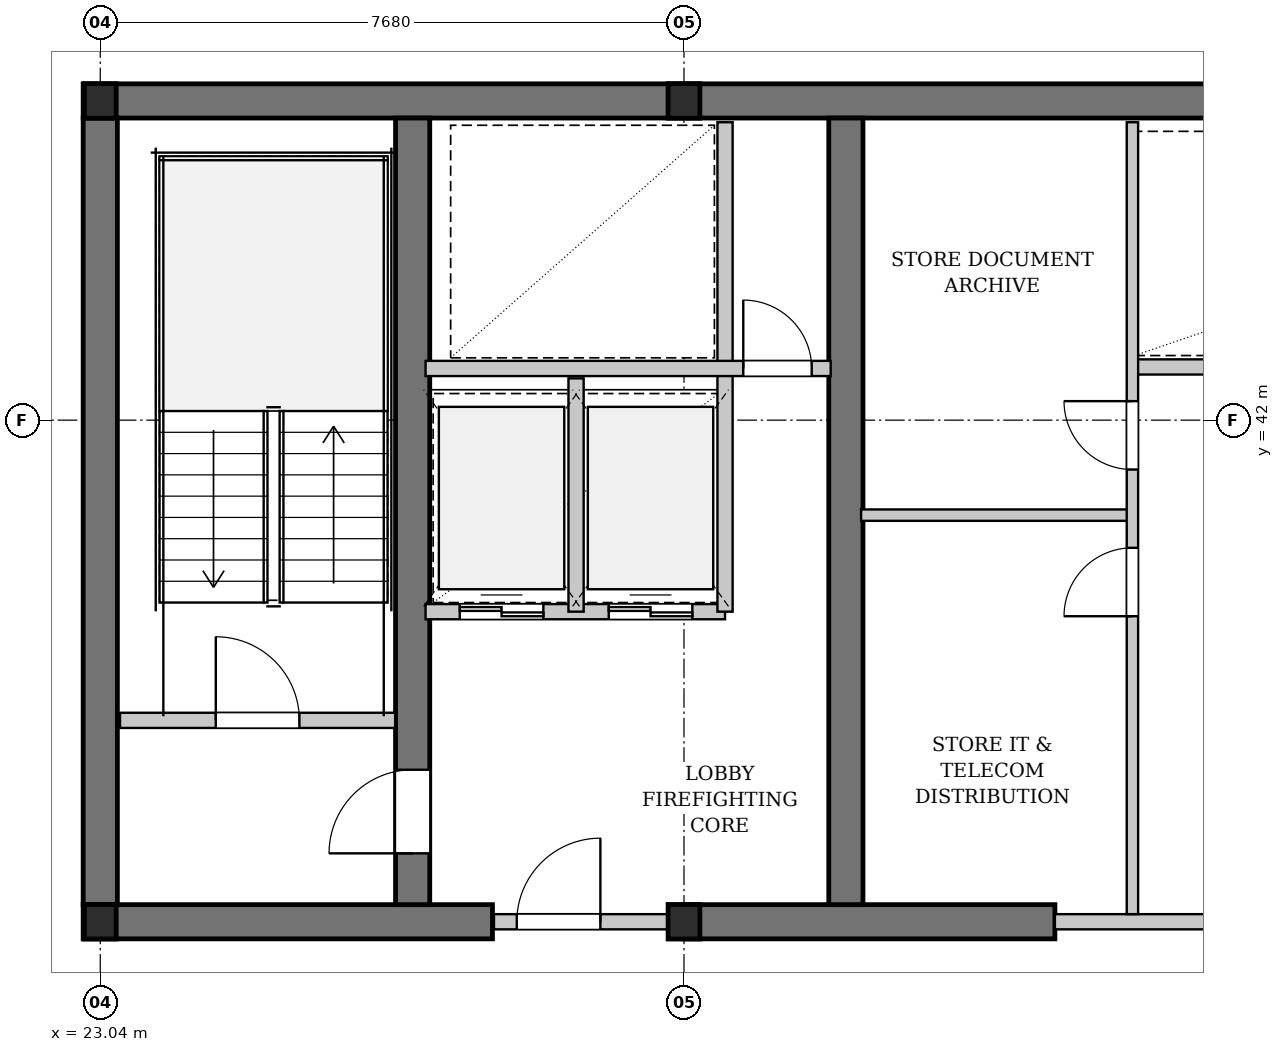
"""IFC4 building model, lengths in metres.
Left out: names, types, materials, properties, quantities, classifications, styles, units other than length and angle.
Written with IfcOpenShell. Run it as: python <this file> out.ifc"""

import sys

from ifc_helpers import new_model, si_unit, direction, frame, frame_2d, origin, origin_2d, place, context, subcontext, project, spatial, rectangle, i_section, extrude, element, fill, save


model = new_model("IFC4")
c1 = context("Model", 3, precision=1e-05, world=origin(), true_north=direction((0.0, 1.0)))
c2 = subcontext(c1, "Body", "Model", "MODEL_VIEW")
j1 = project(units=[si_unit("LENGTHUNIT", "METRE"), si_unit("PLANEANGLEUNIT", "RADIAN")], contexts=[c1])
p1 = place(None, origin())
s1 = spatial("IfcSite", under=j1, at=p1, CompositionType="ELEMENT")
p2 = place(p1, origin())
s2 = spatial("IfcBuilding", under=s1, at=p2, CompositionType="ELEMENT")
p3 = place(p2, frame((0.0, 0.0, 155.6)))
s3 = spatial("IfcBuildingStorey", under=s2, at=p3, CompositionType="ELEMENT", Elevation=155.6)
p4 = place(p3, frame((22.815, 46.2, 0.0), z_axis=(0.0, 0.0, 1.0), x_axis=(1.0, 0.0, 0.0)))
e1 = element("IfcWall", 1, at=p4, inside=s3, PredefinedType="SHEAR", context=c2, shape_type="SweptSolid", body=[
    extrude(rectangle(XDim=31.17, YDim=0.45, at=frame_2d((15.585, 0.0))), origin(), (0.0, 0.0, 1.0), 3.08),
])
p5 = place(p3, frame((22.815, 35.4, 0.0), z_axis=(0.0, 0.0, 1.0), x_axis=(1.0, 0.0, 0.0)))
e2 = element("IfcWall", 2, at=p5, inside=s3, PredefinedType="SHEAR", context=c2, shape_type="SweptSolid", body=[
    extrude(rectangle(XDim=5.385, YDim=0.45, at=frame_2d((2.692, 0.0))), origin(), (0.0, 0.0, 1.0), 3.08),
])
p6 = place(p3, frame((30.72, 35.4, 0.0), z_axis=(0.0, 0.0, 1.0), x_axis=(1.0, 0.0, 0.0)))
e3 = element("IfcWall", 3, at=p6, inside=s3, PredefinedType="SHEAR", context=c2, shape_type="SweptSolid", body=[
    extrude(rectangle(XDim=4.88, YDim=0.45, at=frame_2d((2.44, 0.0))), origin(), (0.0, 0.0, 1.0), 3.08),
])
p7 = place(p3, frame((23.04, 35.625, 0.0), z_axis=(0.0, 0.0, 1.0), x_axis=(0.0, 1.0, 0.0)))
e4 = element("IfcWall", 4, at=p7, inside=s3, PredefinedType="SHEAR", context=c2, shape_type="SweptSolid", body=[
    extrude(rectangle(XDim=10.35, YDim=0.45, at=frame_2d((5.175, 0.0))), origin(), (0.0, 0.0, 1.0), 3.08),
])
p8 = place(p3, frame((27.15, 35.625, 0.0), z_axis=(0.0, 0.0, 1.0), x_axis=(0.0, 1.0, 0.0)))
e5 = element("IfcWall", 5, at=p8, inside=s3, PredefinedType="SHEAR", context=c2, shape_type="SweptSolid", body=[
    extrude(rectangle(XDim=10.35, YDim=0.45, at=frame_2d((5.175, 0.0))), origin(), (0.0, 0.0, 1.0), 3.08),
])
p9 = place(p8, frame((0.675, 0.0, 0.0)))
e6 = element("IfcOpeningElement", 6, at=p9, cuts=e5, PredefinedType="OPENING", context=c2, shape_type="SweptSolid", body=[
    extrude(rectangle(XDim=1.1, YDim=2.15, at=frame_2d((0.55, 1.075))), frame((0.0, 0.235, 0.0), z_axis=(0.0, -1.0, 0.0), x_axis=(1.0, 0.0, 0.0)), (0.0, 0.0, 1.0), 0.47),
])
p10 = place(p3, frame((32.85, 35.625, 0.0), z_axis=(0.0, 0.0, 1.0), x_axis=(0.0, 1.0, 0.0)))
e7 = element("IfcWall", 7, at=p10, inside=s3, PredefinedType="SHEAR", context=c2, shape_type="SweptSolid", body=[
    extrude(rectangle(XDim=10.35, YDim=0.45, at=frame_2d((5.175, 0.0))), origin(), (0.0, 0.0, 1.0), 3.08),
])
for number, where, z_axis, x_axis in (
    (8, (23.04, 35.4, 0.0), (0.0, 0.0, 1.0), (1.0, 0.0, 0.0)),
    (9, (23.04, 46.2, 0.0), (0.0, 0.0, 1.0), (1.0, 0.0, 0.0)),
    (10, (30.72, 35.4, 0.0), (0.0, 0.0, 1.0), (1.0, 0.0, 0.0)),
    (11, (30.72, 46.2, 0.0), (0.0, 0.0, 1.0), (1.0, 0.0, 0.0)),
):
    element("IfcColumn", number, at=place(p3, frame(where, z_axis=z_axis, x_axis=x_axis)), inside=s3, PredefinedType="COLUMN", context=c2, shape_type="SweptSolid", body=[
        extrude(i_section(OverallWidth=0.418, OverallDepth=0.455, WebThickness=0.042, FlangeThickness=0.068, FilletRadius=0.015, at=origin_2d()), origin(), (0.0, 0.0, 1.0), 3.3),
    ])
p11 = place(p3, frame((23.3, 38.05, 0.0), z_axis=(0.0, 0.0, 1.0), x_axis=(1.0, 0.0, 0.0)))
e12 = element("IfcWall", 12, at=p11, inside=s3, PredefinedType="PARTITIONING", context=c2, shape_type="SweptSolid", body=[
    extrude(rectangle(XDim=3.62, YDim=0.2, at=frame_2d((1.81, 0.0))), origin(), (0.0, 0.0, 1.0), 3.08),
])
p12 = place(p11, frame((1.26, 0.0, 0.0)))
e13 = element("IfcOpeningElement", 13, at=p12, cuts=e12, PredefinedType="OPENING", context=c2, shape_type="SweptSolid", body=[
    extrude(rectangle(XDim=1.1, YDim=2.15, at=frame_2d((0.55, 1.075))), frame((0.0, 0.11, 0.0), z_axis=(0.0, -1.0, 0.0), x_axis=(1.0, 0.0, 0.0)), (0.0, 0.0, 1.0), 0.22),
])
p13 = place(p3, frame((28.22, 35.4, 0.0), z_axis=(0.0, 0.0, 1.0), x_axis=(1.0, 0.0, 0.0)))
e14 = element("IfcWall", 14, at=p13, inside=s3, PredefinedType="PARTITIONING", context=c2, shape_type="SweptSolid", body=[
    extrude(rectangle(XDim=2.5, YDim=0.2, at=frame_2d((1.25, 0.0))), origin(), (0.0, 0.0, 1.0), 2.475),
])
p14 = place(p13, frame((0.3, 0.0, 0.0)))
e15 = element("IfcOpeningElement", 15, at=p14, cuts=e14, PredefinedType="OPENING", context=c2, shape_type="SweptSolid", body=[
    extrude(rectangle(XDim=1.1, YDim=2.15, at=frame_2d((0.55, 1.075))), frame((0.0, 0.11, 0.0), z_axis=(0.0, -1.0, 0.0), x_axis=(1.0, 0.0, 0.0)), (0.0, 0.0, 1.0), 0.22),
])
p15 = place(p3, frame((27.32, 39.48, 0.0), z_axis=(0.0, 0.0, 1.0), x_axis=(1.0, 0.0, 0.0)))
e16 = element("IfcWall", 16, at=p15, inside=s3, PredefinedType="PARTITIONING", context=c2, shape_type="SweptSolid", body=[
    extrude(rectangle(XDim=3.94, YDim=0.2, at=frame_2d((1.97, 0.0))), origin(), (0.0, 0.0, 1.0), 3.08),
])
p16 = place(p15, frame((0.45, 0.0, 0.0)))
e17 = element("IfcOpeningElement", 17, at=p16, cuts=e16, PredefinedType="OPENING", context=c2, shape_type="SweptSolid", body=[
    extrude(rectangle(XDim=1.1, YDim=2.2, at=frame_2d((0.55, 1.1))), frame((0.0, 0.11, 0.0), z_axis=(0.0, -1.0, 0.0), x_axis=(1.0, 0.0, 0.0)), (0.0, 0.0, 1.0), 0.22),
])
p17 = place(p15, frame((2.41, 0.0, 0.0)))
e18 = element("IfcOpeningElement", 18, at=p17, cuts=e16, PredefinedType="OPENING", context=c2, shape_type="SweptSolid", body=[
    extrude(rectangle(XDim=1.1, YDim=2.2, at=frame_2d((0.55, 1.1))), frame((0.0, 0.11, 0.0), z_axis=(0.0, -1.0, 0.0), x_axis=(1.0, 0.0, 0.0)), (0.0, 0.0, 1.0), 0.22),
])
p18 = place(p3, frame((29.3, 39.48, 0.0), z_axis=(0.0, 0.0, 1.0), x_axis=(0.0, 1.0, 0.0)))
e19 = element("IfcWall", 19, at=p18, inside=s3, PredefinedType="PARTITIONING", context=c2, shape_type="SweptSolid", body=[
    extrude(rectangle(XDim=3.07, YDim=0.2, at=frame_2d((1.535, 0.0))), origin(), (0.0, 0.0, 1.0), 3.08),
])
p19 = place(p3, frame((31.26, 39.48, 0.0), z_axis=(0.0, 0.0, 1.0), x_axis=(0.0, 1.0, 0.0)))
e20 = element("IfcWall", 20, at=p19, inside=s3, PredefinedType="PARTITIONING", context=c2, shape_type="SweptSolid", body=[
    extrude(rectangle(XDim=6.44, YDim=0.2, at=frame_2d((3.22, 0.0))), origin(), (0.0, 0.0, 1.0), 3.08),
])
p20 = place(p3, frame((27.32, 42.68, 0.0), z_axis=(0.0, 0.0, 1.0), x_axis=(1.0, 0.0, 0.0)))
e21 = element("IfcWall", 21, at=p20, inside=s3, PredefinedType="PARTITIONING", context=c2, shape_type="SweptSolid", body=[
    extrude(rectangle(XDim=5.33, YDim=0.2, at=frame_2d((2.665, 0.0))), origin(), (0.0, 0.0, 1.0), 3.08),
])
p21 = place(p20, frame((4.18, 0.0, 0.0)))
e22 = element("IfcOpeningElement", 22, at=p21, cuts=e21, PredefinedType="OPENING", context=c2, shape_type="SweptSolid", body=[
    extrude(rectangle(XDim=0.9, YDim=2.15, at=frame_2d((0.45, 1.075))), frame((0.0, 0.11, 0.0), z_axis=(0.0, -1.0, 0.0), x_axis=(1.0, 0.0, 0.0)), (0.0, 0.0, 1.0), 0.22),
])
p22 = place(p3, frame((35.6, 35.4, 0.0), z_axis=(0.0, 0.0, 1.0), x_axis=(1.0, 0.0, 0.0)))
e23 = element("IfcWall", 23, at=p22, inside=s3, PredefinedType="PARTITIONING", context=c2, shape_type="SweptSolid", body=[
    extrude(rectangle(XDim=6.5, YDim=0.2, at=frame_2d((3.25, 0.0))), origin(), (0.0, 0.0, 1.0), 2.475),
])
p23 = place(p22, frame((3.8, 0.0, 0.0)))
e24 = element("IfcOpeningElement", 24, at=p23, cuts=e23, PredefinedType="OPENING", context=c2, shape_type="SweptSolid", body=[
    extrude(rectangle(XDim=1.8, YDim=2.3, at=frame_2d((0.9, 1.15))), frame((0.0, 0.11, 0.0), z_axis=(0.0, -1.0, 0.0), x_axis=(1.0, 0.0, 0.0)), (0.0, 0.0, 1.0), 0.22),
])
p24 = place(p3, frame((36.6, 42.7, 0.0), z_axis=(0.0, 0.0, 1.0), x_axis=(1.0, 0.0, 0.0)))
e25 = element("IfcWall", 25, at=p24, inside=s3, PredefinedType="PARTITIONING", context=c2, shape_type="SweptSolid", body=[
    extrude(rectangle(XDim=5.25, YDim=0.2, at=frame_2d((2.625, 0.0))), origin(), (0.0, 0.0, 1.0), 3.08),
])
p25 = place(p3, frame((33.05, 40.75, 0.0), z_axis=(0.0, 0.0, 1.0), x_axis=(1.0, 0.0, 0.0)))
e26 = element("IfcWall", 26, at=p25, inside=s3, PredefinedType="PARTITIONING", context=c2, shape_type="SweptSolid", body=[
    extrude(rectangle(XDim=3.57, YDim=0.15, at=frame_2d((1.785, 0.0))), origin(), (0.0, 0.0, 1.0), 3.08),
])
p26 = place(p3, frame((36.62, 35.5, 0.0), z_axis=(0.0, 0.0, 1.0), x_axis=(0.0, 1.0, 0.0)))
e27 = element("IfcWall", 27, at=p26, inside=s3, PredefinedType="PARTITIONING", context=c2, shape_type="SweptSolid", body=[
    extrude(rectangle(XDim=10.42, YDim=0.15, at=frame_2d((5.21, 0.0))), origin(), (0.0, 0.0, 1.0), 3.08),
])
p27 = place(p26, frame((3.92, 0.0, 0.0)))
e28 = element("IfcOpeningElement", 28, at=p27, cuts=e27, PredefinedType="OPENING", context=c2, shape_type="SweptSolid", body=[
    extrude(rectangle(XDim=0.9, YDim=2.15, at=frame_2d((0.45, 1.075))), frame((0.0, 0.085, 0.0), z_axis=(0.0, -1.0, 0.0), x_axis=(1.0, 0.0, 0.0)), (0.0, 0.0, 1.0), 0.17),
])
p28 = place(p26, frame((5.85, 0.0, 0.0)))
e29 = element("IfcOpeningElement", 29, at=p28, cuts=e27, PredefinedType="OPENING", context=c2, shape_type="SweptSolid", body=[
    extrude(rectangle(XDim=0.9, YDim=2.15, at=frame_2d((0.45, 1.075))), frame((0.0, 0.085, 0.0), z_axis=(0.0, -1.0, 0.0), x_axis=(1.0, 0.0, 0.0)), (0.0, 0.0, 1.0), 0.17),
])
p29 = place(p12, origin())
e30 = element("IfcDoor", 30, at=p29, inside=s3, OperationType="SINGLE_SWING_LEFT", PredefinedType="DOOR", context=c2, shape_type="SweptSolid", body=[
    extrude(rectangle(XDim=1.1, YDim=2.15, at=frame_2d((0.55, 1.075))), frame((0.0, 0.025, 0.0), z_axis=(0.0, -1.0, 0.0), x_axis=(1.0, 0.0, 0.0)), (0.0, 0.0, 1.0), 0.05),
])
fill(e13, e30)
p30 = place(p14, origin())
e31 = element("IfcDoor", 31, at=p30, inside=s3, OperationType="SINGLE_SWING_RIGHT", PredefinedType="DOOR", context=c2, shape_type="SweptSolid", body=[
    extrude(rectangle(XDim=1.1, YDim=2.15, at=frame_2d((0.55, 1.075))), frame((0.0, 0.025, 0.0), z_axis=(0.0, -1.0, 0.0), x_axis=(1.0, 0.0, 0.0)), (0.0, 0.0, 1.0), 0.05),
])
fill(e15, e31)
p31 = place(p16, origin())
e32 = element("IfcDoor", 32, at=p31, inside=s3, OperationType="DOUBLE_DOOR_SLIDING", PredefinedType="DOOR", context=c2, shape_type="SweptSolid", body=[
    extrude(rectangle(XDim=1.1, YDim=2.2, at=frame_2d((0.55, 1.1))), frame((0.0, 0.025, 0.0), z_axis=(0.0, -1.0, 0.0), x_axis=(1.0, 0.0, 0.0)), (0.0, 0.0, 1.0), 0.05),
])
fill(e17, e32)
p32 = place(p17, origin())
e33 = element("IfcDoor", 33, at=p32, inside=s3, OperationType="DOUBLE_DOOR_SLIDING", PredefinedType="DOOR", context=c2, shape_type="SweptSolid", body=[
    extrude(rectangle(XDim=1.1, YDim=2.2, at=frame_2d((0.55, 1.1))), frame((0.0, 0.025, 0.0), z_axis=(0.0, -1.0, 0.0), x_axis=(1.0, 0.0, 0.0)), (0.0, 0.0, 1.0), 0.05),
])
fill(e18, e33)
p33 = place(p21, origin())
e34 = element("IfcDoor", 34, at=p33, inside=s3, OperationType="SINGLE_SWING_LEFT", PredefinedType="DOOR", context=c2, shape_type="SweptSolid", body=[
    extrude(rectangle(XDim=0.9, YDim=2.15, at=frame_2d((0.45, 1.075))), frame((0.0, 0.025, 0.0), z_axis=(0.0, -1.0, 0.0), x_axis=(1.0, 0.0, 0.0)), (0.0, 0.0, 1.0), 0.05),
])
fill(e22, e34)
p34 = place(p27, origin())
e35 = element("IfcDoor", 35, at=p34, inside=s3, OperationType="SINGLE_SWING_LEFT", PredefinedType="DOOR", context=c2, shape_type="SweptSolid", body=[
    extrude(rectangle(XDim=0.9, YDim=2.15, at=frame_2d((0.45, 1.075))), frame((0.0, 0.025, 0.0), z_axis=(0.0, -1.0, 0.0), x_axis=(1.0, 0.0, 0.0)), (0.0, 0.0, 1.0), 0.05),
])
fill(e28, e35)
p35 = place(p28, origin())
e36 = element("IfcDoor", 36, at=p35, inside=s3, OperationType="SINGLE_SWING_RIGHT", PredefinedType="DOOR", context=c2, shape_type="SweptSolid", body=[
    extrude(rectangle(XDim=0.9, YDim=2.15, at=frame_2d((0.45, 1.075))), frame((0.0, 0.025, 0.0), z_axis=(0.0, -1.0, 0.0), x_axis=(1.0, 0.0, 0.0)), (0.0, 0.0, 1.0), 0.05),
])
fill(e29, e36)
p36 = place(p9, origin())
e37 = element("IfcDoor", 37, at=p36, inside=s3, OperationType="SINGLE_SWING_LEFT", PredefinedType="DOOR", context=c2, shape_type="SweptSolid", body=[
    extrude(rectangle(XDim=1.1, YDim=2.15, at=frame_2d((0.55, 1.075))), frame((0.0, 0.025, 0.0), z_axis=(0.0, -1.0, 0.0), x_axis=(1.0, 0.0, 0.0)), (0.0, 0.0, 1.0), 0.05),
])
fill(e6, e37)
save(model, sys.argv[1])
